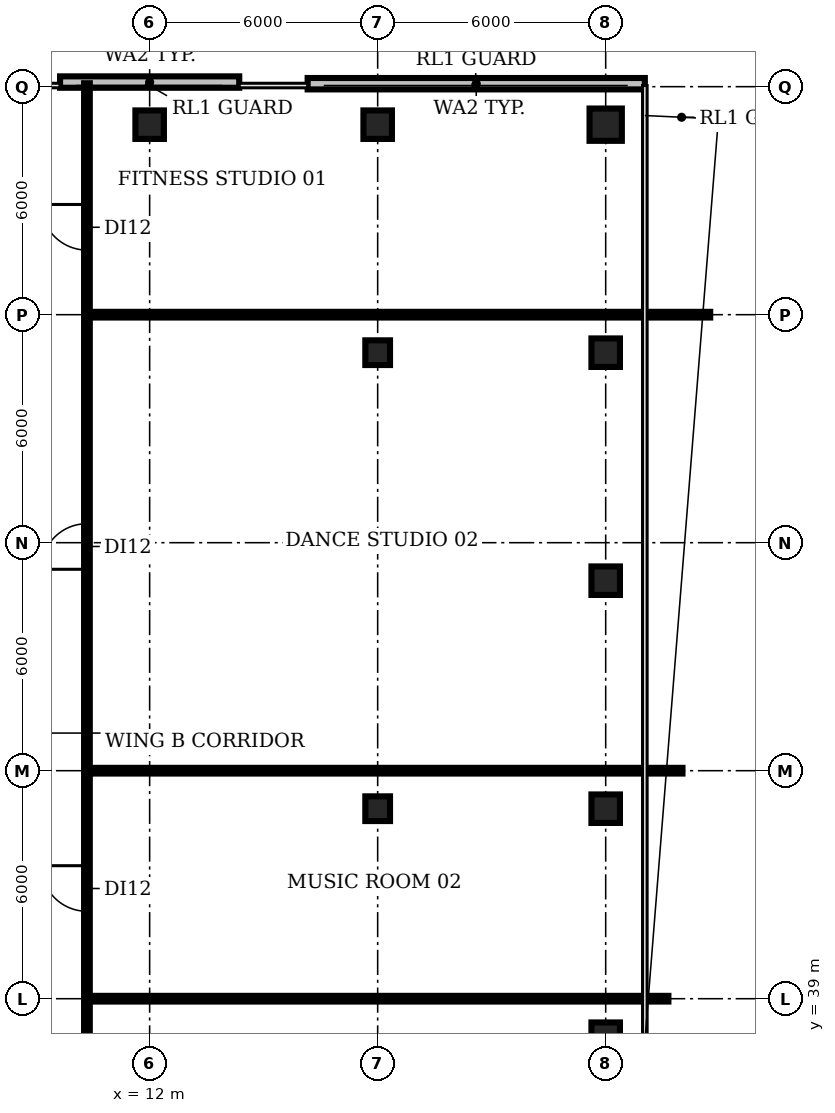
"""IFC4 building model, lengths in metres.
Left out: names, types, materials, properties, quantities, classifications, styles, units other than length and angle.
Written with IfcOpenShell. Run it as: python <this file> out.ifc"""

import sys

from ifc_helpers import new_model, si_unit, direction, frame, frame_2d, origin, origin_2d, place, context, subcontext, project, spatial, rectangle, circle, extrude, element, fill, save


model = new_model("IFC4")
c1 = context("Model", 3, precision=1e-05, world=origin(), true_north=direction((0.0, 1.0)))
c2 = subcontext(c1, "Body", "Model", "MODEL_VIEW")
j1 = project(units=[si_unit("LENGTHUNIT", "METRE"), si_unit("PLANEANGLEUNIT", "RADIAN")], contexts=[c1])
p1 = place(None, origin())
s1 = spatial("IfcSite", under=j1, at=p1, CompositionType="ELEMENT")
p2 = place(p1, origin())
s2 = spatial("IfcBuilding", under=s1, at=p2, CompositionType="ELEMENT")
p3 = place(p2, frame((0.0, 0.0, 272.6)))
s3 = spatial("IfcBuildingStorey", under=s2, at=p3, CompositionType="ELEMENT", Elevation=272.6)
p4 = place(p3, frame((12.0, 62.0, 0.0), z_axis=(0.0, 0.0, 1.0), x_axis=(1.0, 0.0, 0.0)))
e1 = element("IfcColumn", 1, at=p4, inside=s3, PredefinedType="COLUMN", context=c2, shape_type="SweptSolid", body=[
    extrude(rectangle(XDim=0.75, YDim=0.75, at=origin_2d()), origin(), (0.0, 0.0, 1.0), 3.85),
])
for number, where, z_axis, x_axis in (
    (2, (18.0, 44.0, 0.0), (0.0, 0.0, 1.0), (1.0, 0.0, 0.0)),
    (3, (18.0, 56.0, 0.0), (0.0, 0.0, 1.0), (1.0, 0.0, 0.0)),
):
    element("IfcColumn", number, at=place(p3, frame(where, z_axis=z_axis, x_axis=x_axis)), inside=s3, PredefinedType="COLUMN", context=c2, shape_type="SweptSolid", body=[
        extrude(rectangle(XDim=0.65, YDim=0.65, at=origin_2d()), origin(), (0.0, 0.0, 1.0), 3.85),
    ])
for number, where, z_axis, x_axis in (
    (4, (18.0, 62.0, 0.0), (0.0, 0.0, 1.0), (1.0, 0.0, 0.0)),
    (5, (24.0, 38.0, 0.0), (0.0, 0.0, 1.0), (1.0, 0.0, 0.0)),
    (6, (24.0, 44.0, 0.0), (0.0, 0.0, 1.0), (1.0, 0.0, 0.0)),
    (7, (24.0, 50.0, 0.0), (0.0, 0.0, 1.0), (1.0, 0.0, 0.0)),
    (8, (24.0, 56.0, 0.0), (0.0, 0.0, 1.0), (1.0, 0.0, 0.0)),
):
    element("IfcColumn", number, at=place(p3, frame(where, z_axis=z_axis, x_axis=x_axis)), inside=s3, PredefinedType="COLUMN", context=c2, shape_type="SweptSolid", body=[
        extrude(rectangle(XDim=0.75, YDim=0.75, at=origin_2d()), origin(), (0.0, 0.0, 1.0), 3.85),
    ])
p5 = place(p3, frame((24.0, 62.0, 0.0), z_axis=(0.0, 0.0, 1.0), x_axis=(1.0, 0.0, 0.0)))
e9 = element("IfcColumn", 9, at=p5, inside=s3, PredefinedType="COLUMN", context=c2, shape_type="SweptSolid", body=[
    extrude(circle(Radius=0.425, at=origin_2d()), origin(), (0.0, 0.0, 1.0), 3.85),
])
p6 = place(p3, frame((25.03, 63.078, 0.0), z_axis=(0.0, 0.0, 1.0), x_axis=(-1.0, 0.0, 0.0)))
e10 = element("IfcWall", 10, at=p6, inside=s3, PredefinedType="SOLIDWALL", context=c2, shape_type="SweptSolid", body=[
    extrude(rectangle(XDim=8.873, YDim=0.3, at=frame_2d((4.436, 0.0))), origin(), (0.0, 0.0, 1.0), 3.85),
])
p7 = place(p3, frame((14.357, 63.122, 0.0), z_axis=(0.0, 0.0, 1.0), x_axis=(-1.0, 0.0, 0.0)))
e11 = element("IfcWall", 11, at=p7, inside=s3, PredefinedType="SOLIDWALL", context=c2, shape_type="SweptSolid", body=[
    extrude(rectangle(XDim=4.715, YDim=0.3, at=frame_2d((2.357, 0.0))), origin(), (0.0, 0.0, 1.0), 3.85),
])
p8 = place(p3, frame((10.35, 39.0, 0.0), z_axis=(0.0, 0.0, 1.0), x_axis=(0.0, -1.0, 0.0)))
e12 = element("IfcWall", 12, at=p8, inside=s3, PredefinedType="PARTITIONING", context=c2, shape_type="SweptSolid", body=[
    extrude(rectangle(XDim=5.2, YDim=0.15, at=frame_2d((2.6, 0.0))), origin(), (0.0, 0.0, 1.0), 2.9),
])
p9 = place(p8, frame((2.2, 0.0, 0.0)))
e13 = element("IfcOpeningElement", 13, at=p9, cuts=e12, PredefinedType="OPENING", context=c2, shape_type="SweptSolid", body=[
    extrude(rectangle(XDim=1.0, YDim=2.1, at=frame_2d((0.5, 1.05))), frame((0.0, 0.085, 0.0), z_axis=(0.0, -1.0, 0.0), x_axis=(1.0, 0.0, 0.0)), (0.0, 0.0, 1.0), 0.17),
])
p10 = place(p3, frame((10.35, 39.0, 0.0), z_axis=(0.0, 0.0, 1.0), x_axis=(0.0, 1.0, 0.0)))
e14 = element("IfcWall", 14, at=p10, inside=s3, PredefinedType="PARTITIONING", context=c2, shape_type="SweptSolid", body=[
    extrude(rectangle(XDim=6.0, YDim=0.15, at=frame_2d((3.0, 0.0))), origin(), (0.0, 0.0, 1.0), 2.9),
])
p11 = place(p10, frame((2.3, 0.0, 0.0)))
e15 = element("IfcOpeningElement", 15, at=p11, cuts=e14, PredefinedType="OPENING", context=c2, shape_type="SweptSolid", body=[
    extrude(rectangle(XDim=1.2, YDim=2.1, at=frame_2d((0.6, 1.05))), frame((0.0, 0.085, 0.0), z_axis=(0.0, -1.0, 0.0), x_axis=(1.0, 0.0, 0.0)), (0.0, 0.0, 1.0), 0.17),
])
p12 = place(p3, frame((10.35, 39.0, 0.0), z_axis=(0.0, 0.0, 1.0), x_axis=(1.0, 0.0, 0.0)))
e16 = element("IfcWall", 16, at=p12, inside=s3, PredefinedType="PARTITIONING", context=c2, shape_type="SweptSolid", body=[
    extrude(rectangle(XDim=15.3, YDim=0.15, at=frame_2d((7.65, 0.0))), origin(), (0.0, 0.0, 1.0), 2.9),
])
p13 = place(p3, frame((10.35, 45.0, 0.0), z_axis=(0.0, 0.0, 1.0), x_axis=(0.0, 1.0, 0.0)))
e17 = element("IfcWall", 17, at=p13, inside=s3, PredefinedType="PARTITIONING", context=c2, shape_type="SweptSolid", body=[
    extrude(rectangle(XDim=12.0, YDim=0.15, at=frame_2d((6.0, 0.0))), origin(), (0.0, 0.0, 1.0), 2.9),
])
p14 = place(p13, frame((5.3, 0.0, 0.0)))
e18 = element("IfcOpeningElement", 18, at=p14, cuts=e17, PredefinedType="OPENING", context=c2, shape_type="SweptSolid", body=[
    extrude(rectangle(XDim=1.2, YDim=2.1, at=frame_2d((0.6, 1.05))), frame((0.0, 0.085, 0.0), z_axis=(0.0, -1.0, 0.0), x_axis=(1.0, 0.0, 0.0)), (0.0, 0.0, 1.0), 0.17),
])
p15 = place(p3, frame((10.35, 45.0, 0.0), z_axis=(0.0, 0.0, 1.0), x_axis=(1.0, 0.0, 0.0)))
e19 = element("IfcWall", 19, at=p15, inside=s3, PredefinedType="PARTITIONING", context=c2, shape_type="SweptSolid", body=[
    extrude(rectangle(XDim=15.67, YDim=0.15, at=frame_2d((7.835, 0.0))), origin(), (0.0, 0.0, 1.0), 2.9),
])
p16 = place(p3, frame((10.35, 57.0, 0.0), z_axis=(0.0, 0.0, 1.0), x_axis=(0.0, 1.0, 0.0)))
e20 = element("IfcWall", 20, at=p16, inside=s3, PredefinedType="PARTITIONING", context=c2, shape_type="SweptSolid", body=[
    extrude(rectangle(XDim=6.09, YDim=0.15, at=frame_2d((3.045, 0.0))), origin(), (0.0, 0.0, 1.0), 2.9),
])
p17 = place(p16, frame((1.7, 0.0, 0.0)))
e21 = element("IfcOpeningElement", 21, at=p17, cuts=e20, PredefinedType="OPENING", context=c2, shape_type="SweptSolid", body=[
    extrude(rectangle(XDim=1.2, YDim=2.1, at=frame_2d((0.6, 1.05))), frame((0.0, 0.085, 0.0), z_axis=(0.0, -1.0, 0.0), x_axis=(1.0, 0.0, 0.0)), (0.0, 0.0, 1.0), 0.17),
])
p18 = place(p3, frame((10.35, 57.0, 0.0), z_axis=(0.0, 0.0, 1.0), x_axis=(1.0, 0.0, 0.0)))
e22 = element("IfcWall", 22, at=p18, inside=s3, PredefinedType="PARTITIONING", context=c2, shape_type="SweptSolid", body=[
    extrude(rectangle(XDim=16.4, YDim=0.15, at=frame_2d((8.2, 0.0))), origin(), (0.0, 0.0, 1.0), 2.9),
])
p19 = place(p11, origin())
e23 = element("IfcDoor", 23, at=p19, inside=s3, OperationType="SINGLE_SWING_RIGHT", PredefinedType="DOOR", context=c2, shape_type="SweptSolid", body=[
    extrude(rectangle(XDim=1.2, YDim=2.1, at=frame_2d((0.6, 1.05))), frame((0.0, 0.025, 0.0), z_axis=(0.0, -1.0, 0.0), x_axis=(1.0, 0.0, 0.0)), (0.0, 0.0, 1.0), 0.05),
])
fill(e15, e23)
p20 = place(p14, origin())
e24 = element("IfcDoor", 24, at=p20, inside=s3, OperationType="SINGLE_SWING_LEFT", PredefinedType="DOOR", context=c2, shape_type="SweptSolid", body=[
    extrude(rectangle(XDim=1.2, YDim=2.1, at=frame_2d((0.6, 1.05))), frame((0.0, 0.025, 0.0), z_axis=(0.0, -1.0, 0.0), x_axis=(1.0, 0.0, 0.0)), (0.0, 0.0, 1.0), 0.05),
])
fill(e18, e24)
p21 = place(p17, origin())
e25 = element("IfcDoor", 25, at=p21, inside=s3, OperationType="SINGLE_SWING_RIGHT", PredefinedType="DOOR", context=c2, shape_type="SweptSolid", body=[
    extrude(rectangle(XDim=1.2, YDim=2.1, at=frame_2d((0.6, 1.05))), frame((0.0, 0.025, 0.0), z_axis=(0.0, -1.0, 0.0), x_axis=(1.0, 0.0, 0.0)), (0.0, 0.0, 1.0), 0.05),
])
fill(e21, e25)
save(model, sys.argv[1])
